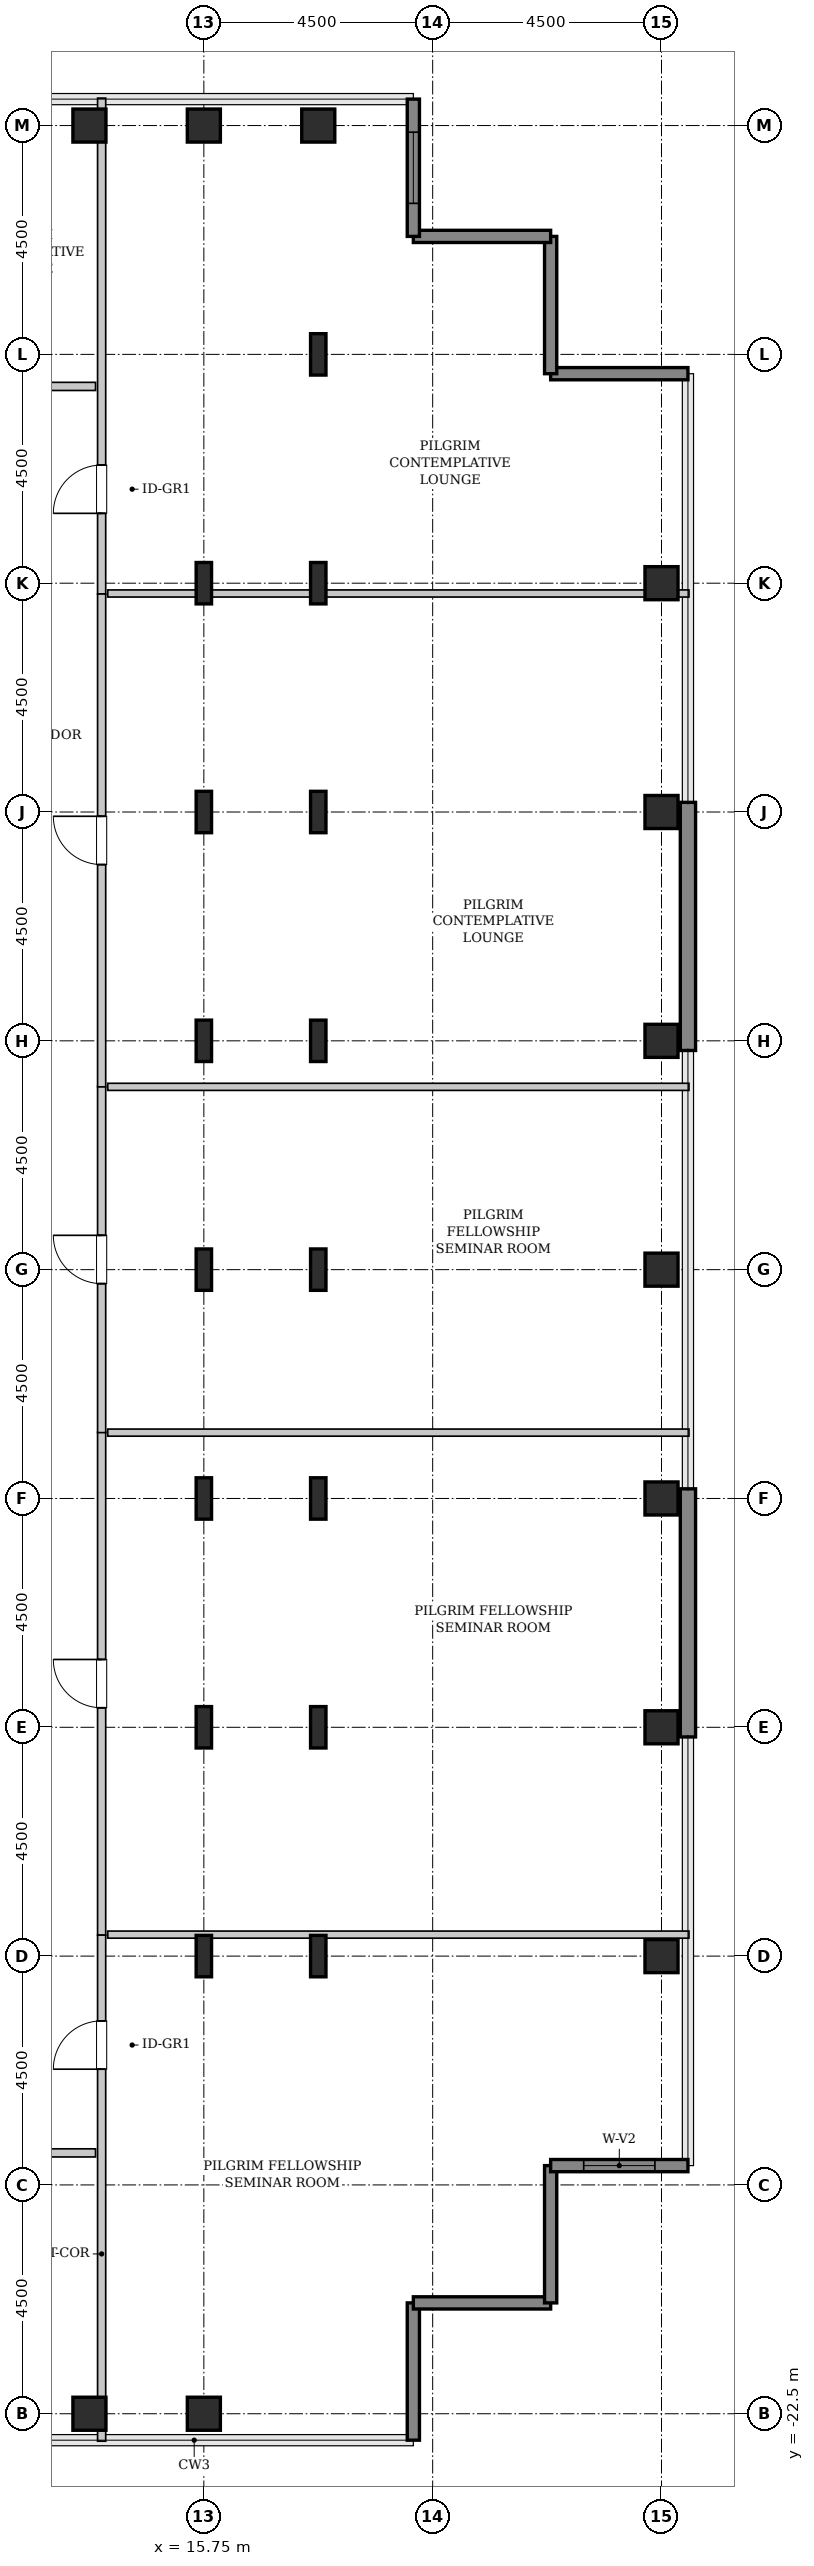
"""IFC4 building model, lengths in metres.
Left out: names, types, materials, properties, quantities, classifications, styles, units other than length and angle.
Written with IfcOpenShell. Run it as: python <this file> out.ifc"""

import sys

from ifc_helpers import new_model, si_unit, direction, frame, frame_2d, origin, origin_2d, place, context, subcontext, project, spatial, rectangle, hollow_rectangle, i_section, extrude, source, transform, mapped, element, fill, save


model = new_model("IFC4")
c1 = context("Model", 3, precision=1e-05, world=origin(), true_north=direction((0.0, 1.0)))
c2 = subcontext(c1, "Body", "Model", "MODEL_VIEW")
j1 = project(units=[si_unit("LENGTHUNIT", "METRE"), si_unit("PLANEANGLEUNIT", "RADIAN")], contexts=[c1])
p1 = place(None, origin())
s1 = spatial("IfcSite", under=j1, at=p1, CompositionType="ELEMENT")
p2 = place(p1, origin())
s2 = spatial("IfcBuilding", under=s1, at=p2, CompositionType="ELEMENT")
p3 = place(p2, frame((0.0, 0.0, 218.0)))
s3 = spatial("IfcBuildingStorey", under=s2, at=p3, CompositionType="ELEMENT", Elevation=218.0)
m1 = source(origin(), c2, "Body", "SweptSolid", [
    extrude(hollow_rectangle(XDim=0.65, YDim=0.65, WallThickness=0.032, InnerFilletRadius=0.032, OuterFilletRadius=0.064, at=origin_2d()), origin(), (0.0, 0.0, 1.0), 3.8),
])
for number, where, z_axis, x_axis in (
    (1, (13.5, -22.5, 0.0), (0.0, 0.0, 1.0), (1.0, 0.0, 0.0)),
    (2, (13.5, 22.5, 0.0), (0.0, 0.0, 1.0), (1.0, 0.0, 0.0)),
    (3, (15.75, -22.5, 0.0), (0.0, 0.0, 1.0), (1.0, 0.0, 0.0)),
):
    element("IfcColumn", number, at=place(p3, frame(where, z_axis=z_axis, x_axis=x_axis)), inside=s3, PredefinedType="COLUMN", context=c2, shape_type="MappedRepresentation", body=[
        mapped(m1, transform((0.0, 0.0, 0.0), x_axis=(1.0, 0.0, 0.0), y_axis=(0.0, 1.0, 0.0), z_axis=(0.0, 0.0, 1.0), scale=1.0)),
    ])
m2 = source(origin(), c2, "Body", "SweptSolid", [
    extrude(i_section(OverallWidth=0.303, OverallDepth=0.814, WebThickness=0.021, FlangeThickness=0.04, FilletRadius=0.03, at=origin_2d()), origin(), (0.0, 0.0, 1.0), 3.8),
])
for number, where, z_axis, x_axis in (
    (4, (15.75, -13.5, 0.0), (0.0, 0.0, 1.0), (1.0, 0.0, 0.0)),
    (5, (15.75, -9.0, 0.0), (0.0, 0.0, 1.0), (1.0, 0.0, 0.0)),
    (6, (15.75, -4.5, 0.0), (0.0, 0.0, 1.0), (1.0, 0.0, 0.0)),
    (7, (15.75, 0.0, 0.0), (0.0, 0.0, 1.0), (1.0, 0.0, 0.0)),
    (8, (15.75, 4.5, 0.0), (0.0, 0.0, 1.0), (1.0, 0.0, 0.0)),
    (9, (15.75, 9.0, 0.0), (0.0, 0.0, 1.0), (1.0, 0.0, 0.0)),
    (10, (15.75, 13.5, 0.0), (0.0, 0.0, 1.0), (1.0, 0.0, 0.0)),
):
    element("IfcColumn", number, at=place(p3, frame(where, z_axis=z_axis, x_axis=x_axis)), inside=s3, PredefinedType="COLUMN", context=c2, shape_type="MappedRepresentation", body=[
        mapped(m2, transform((0.0, 0.0, 0.0), x_axis=(1.0, 0.0, 0.0), y_axis=(0.0, 1.0, 0.0), z_axis=(0.0, 0.0, 1.0), scale=1.0)),
    ])
p4 = place(p3, frame((15.75, 22.5, 0.0), z_axis=(0.0, 0.0, 1.0), x_axis=(1.0, 0.0, 0.0)))
e11 = element("IfcColumn", 11, at=p4, inside=s3, PredefinedType="COLUMN", context=c2, shape_type="MappedRepresentation", body=[
    mapped(m1, transform((0.0, 0.0, 0.0), x_axis=(1.0, 0.0, 0.0), y_axis=(0.0, 1.0, 0.0), z_axis=(0.0, 0.0, 1.0), scale=1.0)),
])
for number, where, z_axis, x_axis in (
    (12, (18.0, -13.5, 0.0), (0.0, 0.0, 1.0), (1.0, 0.0, 0.0)),
    (13, (18.0, -9.0, 0.0), (0.0, 0.0, 1.0), (1.0, 0.0, 0.0)),
    (14, (18.0, -4.5, 0.0), (0.0, 0.0, 1.0), (1.0, 0.0, 0.0)),
    (15, (18.0, 0.0, 0.0), (0.0, 0.0, 1.0), (1.0, 0.0, 0.0)),
    (16, (18.0, 4.5, 0.0), (0.0, 0.0, 1.0), (1.0, 0.0, 0.0)),
    (17, (18.0, 9.0, 0.0), (0.0, 0.0, 1.0), (1.0, 0.0, 0.0)),
    (18, (18.0, 13.5, 0.0), (0.0, 0.0, 1.0), (1.0, 0.0, 0.0)),
    (19, (18.0, 18.0, 0.0), (0.0, 0.0, 1.0), (1.0, 0.0, 0.0)),
):
    element("IfcColumn", number, at=place(p3, frame(where, z_axis=z_axis, x_axis=x_axis)), inside=s3, PredefinedType="COLUMN", context=c2, shape_type="MappedRepresentation", body=[
        mapped(m2, transform((0.0, 0.0, 0.0), x_axis=(1.0, 0.0, 0.0), y_axis=(0.0, 1.0, 0.0), z_axis=(0.0, 0.0, 1.0), scale=1.0)),
    ])
for number, where, z_axis, x_axis in (
    (20, (18.0, 22.5, 0.0), (0.0, 0.0, 1.0), (1.0, 0.0, 0.0)),
    (21, (24.75, -13.5, 0.0), (0.0, 0.0, 1.0), (1.0, 0.0, 0.0)),
    (22, (24.75, -9.0, 0.0), (0.0, 0.0, 1.0), (1.0, 0.0, 0.0)),
    (23, (24.75, -4.5, 0.0), (0.0, 0.0, 1.0), (1.0, 0.0, 0.0)),
    (24, (24.75, 0.0, 0.0), (0.0, 0.0, 1.0), (1.0, 0.0, 0.0)),
    (25, (24.75, 4.5, 0.0), (0.0, 0.0, 1.0), (1.0, 0.0, 0.0)),
    (26, (24.75, 9.0, 0.0), (0.0, 0.0, 1.0), (1.0, 0.0, 0.0)),
    (27, (24.75, 13.5, 0.0), (0.0, 0.0, 1.0), (1.0, 0.0, 0.0)),
):
    element("IfcColumn", number, at=place(p3, frame(where, z_axis=z_axis, x_axis=x_axis)), inside=s3, PredefinedType="COLUMN", context=c2, shape_type="MappedRepresentation", body=[
        mapped(m1, transform((0.0, 0.0, 0.0), x_axis=(1.0, 0.0, 0.0), y_axis=(0.0, 1.0, 0.0), z_axis=(0.0, 0.0, 1.0), scale=1.0)),
    ])
m3 = source(origin(), c2, "Body", "SweptSolid", [
    extrude(rectangle(XDim=4.88, YDim=0.3, at=frame_2d((2.44, 0.0))), origin(), (0.0, 0.0, 1.0), 3.55),
])
for number, where, z_axis, x_axis in (
    (28, (25.27, -9.19, 0.0), (0.0, 0.0, 1.0), (0.0, 1.0, 0.0)),
    (29, (25.27, 4.31, 0.0), (0.0, 0.0, 1.0), (0.0, 1.0, 0.0)),
):
    element("IfcWall", number, at=place(p3, frame(where, z_axis=z_axis, x_axis=x_axis)), inside=s3, PredefinedType="SHEAR", context=c2, shape_type="MappedRepresentation", body=[
        mapped(m3, transform((0.0, 0.0, 0.0), x_axis=(1.0, 0.0, 0.0), y_axis=(0.0, 1.0, 0.0), z_axis=(0.0, 0.0, 1.0), scale=1.0)),
    ])
m4 = source(origin(), c2, "Body", "SweptSolid", [
    extrude(rectangle(XDim=2.7, YDim=0.24, at=frame_2d((1.35, 0.0))), origin(), (0.0, 0.0, 1.0), 3.55),
])
for number, where, z_axis, x_axis in (
    (30, (19.87, -23.02, 0.0), (0.0, 0.0, 1.0), (0.0, 1.0, 0.0)),
    (31, (19.87, -20.32, 0.0), (0.0, 0.0, 1.0), (1.0, 0.0, 0.0)),
    (32, (22.57, -20.32, 0.0), (0.0, 0.0, 1.0), (0.0, 1.0, 0.0)),
):
    element("IfcWall", number, at=place(p3, frame(where, z_axis=z_axis, x_axis=x_axis)), inside=s3, PredefinedType="SHEAR", context=c2, shape_type="MappedRepresentation", body=[
        mapped(m4, transform((0.0, 0.0, 0.0), x_axis=(1.0, 0.0, 0.0), y_axis=(0.0, 1.0, 0.0), z_axis=(0.0, 0.0, 1.0), scale=1.0)),
    ])
p5 = place(p3, frame((22.57, -17.62, 0.0), z_axis=(0.0, 0.0, 1.0), x_axis=(1.0, 0.0, 0.0)))
e33 = element("IfcWall", 33, at=p5, inside=s3, PredefinedType="SHEAR", context=c2, shape_type="MappedRepresentation", body=[
    mapped(m4, transform((0.0, 0.0, 0.0), x_axis=(1.0, 0.0, 0.0), y_axis=(0.0, 1.0, 0.0), z_axis=(0.0, 0.0, 1.0), scale=1.0)),
])
p6 = place(p5, frame((0.65, 0.0, 0.85)))
e34 = element("IfcOpeningElement", 34, at=p6, cuts=e33, PredefinedType="OPENING", context=c2, shape_type="SweptSolid", body=[
    extrude(rectangle(XDim=1.4, YDim=1.8, at=frame_2d((0.7, 0.9))), frame((0.0, 0.13, 0.0), z_axis=(0.0, -1.0, 0.0), x_axis=(1.0, 0.0, 0.0)), (0.0, 0.0, 1.0), 0.26),
])
for number, where, z_axis, x_axis in (
    (35, (25.27, 17.62, 0.0), (0.0, 0.0, 1.0), (-1.0, 0.0, 0.0)),
    (36, (22.57, 17.62, 0.0), (0.0, 0.0, 1.0), (0.0, 1.0, 0.0)),
    (37, (22.57, 20.32, 0.0), (0.0, 0.0, 1.0), (-1.0, 0.0, 0.0)),
):
    element("IfcWall", number, at=place(p3, frame(where, z_axis=z_axis, x_axis=x_axis)), inside=s3, PredefinedType="SHEAR", context=c2, shape_type="MappedRepresentation", body=[
        mapped(m4, transform((0.0, 0.0, 0.0), x_axis=(1.0, 0.0, 0.0), y_axis=(0.0, 1.0, 0.0), z_axis=(0.0, 0.0, 1.0), scale=1.0)),
    ])
p7 = place(p3, frame((19.87, 20.32, 0.0), z_axis=(0.0, 0.0, 1.0), x_axis=(0.0, 1.0, 0.0)))
e38 = element("IfcWall", 38, at=p7, inside=s3, PredefinedType="SHEAR", context=c2, shape_type="MappedRepresentation", body=[
    mapped(m4, transform((0.0, 0.0, 0.0), x_axis=(1.0, 0.0, 0.0), y_axis=(0.0, 1.0, 0.0), z_axis=(0.0, 0.0, 1.0), scale=1.0)),
])
p8 = place(p7, frame((0.65, 0.0, 0.85)))
e39 = element("IfcOpeningElement", 39, at=p8, cuts=e38, PredefinedType="OPENING", context=c2, shape_type="SweptSolid", body=[
    extrude(rectangle(XDim=1.4, YDim=1.8, at=frame_2d((0.7, 0.9))), frame((0.0, 0.13, 0.0), z_axis=(0.0, -1.0, 0.0), x_axis=(1.0, 0.0, 0.0)), (0.0, 0.0, 1.0), 0.26),
])
m5 = source(origin(), c2, "Body", "SweptSolid", [
    extrude(rectangle(XDim=9.892, YDim=0.16, at=frame_2d((4.946, 0.0))), origin(), (0.0, 0.0, 1.0), 3.535),
])
p9 = place(p3, frame((13.74, -13.087, 0.0), z_axis=(0.0, 0.0, 1.0), x_axis=(0.0, 1.0, 0.0)))
e40 = element("IfcWall", 40, at=p9, inside=s3, PredefinedType="PARTITIONING", context=c2, shape_type="MappedRepresentation", body=[
    mapped(m5, transform((0.0, 0.0, 0.0), x_axis=(1.0, 0.0, 0.0), y_axis=(0.0, 1.0, 0.0), z_axis=(0.0, 0.0, 1.0), scale=1.0)),
])
p10 = place(p9, frame((4.471, 0.0, 0.0)))
e41 = element("IfcOpeningElement", 41, at=p10, cuts=e40, PredefinedType="OPENING", context=c2, shape_type="SweptSolid", body=[
    extrude(rectangle(XDim=0.95, YDim=2.1, at=frame_2d((0.475, 1.05))), frame((0.0, 0.09, 0.0), z_axis=(0.0, -1.0, 0.0), x_axis=(1.0, 0.0, 0.0)), (0.0, 0.0, 1.0), 0.18),
])
m6 = source(origin(), c2, "Body", "SweptSolid", [
    extrude(rectangle(XDim=11.43, YDim=0.14, at=frame_2d((5.715, 0.0))), origin(), (0.0, 0.0, 1.0), 2.925),
])
p11 = place(p3, frame((13.86, -13.077, 0.0), z_axis=(0.0, 0.0, 1.0), x_axis=(1.0, 0.0, 0.0)))
e42 = element("IfcWall", 42, at=p11, inside=s3, PredefinedType="PARTITIONING", context=c2, shape_type="MappedRepresentation", body=[
    mapped(m6, transform((0.0, 0.0, 0.0), x_axis=(1.0, 0.0, 0.0), y_axis=(0.0, 1.0, 0.0), z_axis=(0.0, 0.0, 1.0), scale=1.0)),
])
m7 = source(origin(), c2, "Body", "SweptSolid", [
    extrude(rectangle(XDim=11.43, YDim=0.14, at=frame_2d((5.715, 0.0))), origin(), (0.0, 0.0, 1.0), 3.535),
])
p12 = place(p3, frame((13.86, -3.205, 0.0), z_axis=(0.0, 0.0, 1.0), x_axis=(1.0, 0.0, 0.0)))
e43 = element("IfcWall", 43, at=p12, inside=s3, PredefinedType="PARTITIONING", context=c2, shape_type="MappedRepresentation", body=[
    mapped(m7, transform((0.0, 0.0, 0.0), x_axis=(1.0, 0.0, 0.0), y_axis=(0.0, 1.0, 0.0), z_axis=(0.0, 0.0, 1.0), scale=1.0)),
])
m8 = source(origin(), c2, "Body", "SweptSolid", [
    extrude(rectangle(XDim=9.953, YDim=0.16, at=frame_2d((4.976, 0.0))), origin(), (0.0, 0.0, 1.0), 3.535),
])
p13 = place(p3, frame((13.74, -23.04, 0.0), z_axis=(0.0, 0.0, 1.0), x_axis=(0.0, 1.0, 0.0)))
e44 = element("IfcWall", 44, at=p13, inside=s3, PredefinedType="PARTITIONING", context=c2, shape_type="MappedRepresentation", body=[
    mapped(m8, transform((0.0, 0.0, 0.0), x_axis=(1.0, 0.0, 0.0), y_axis=(0.0, 1.0, 0.0), z_axis=(0.0, 0.0, 1.0), scale=1.0)),
])
p14 = place(p13, frame((7.316, 0.0, 0.0)))
e45 = element("IfcOpeningElement", 45, at=p14, cuts=e44, PredefinedType="OPENING", context=c2, shape_type="SweptSolid", body=[
    extrude(rectangle(XDim=0.95, YDim=2.1, at=frame_2d((0.475, 1.05))), frame((0.0, 0.09, 0.0), z_axis=(0.0, -1.0, 0.0), x_axis=(1.0, 0.0, 0.0)), (0.0, 0.0, 1.0), 0.18),
])
m9 = source(origin(), c2, "Body", "SweptSolid", [
    extrude(rectangle(XDim=6.81, YDim=0.16, at=frame_2d((3.405, 0.0))), origin(), (0.0, 0.0, 1.0), 3.535),
])
p15 = place(p3, frame((13.74, -3.205, 0.0), z_axis=(0.0, 0.0, 1.0), x_axis=(0.0, 1.0, 0.0)))
e46 = element("IfcWall", 46, at=p15, inside=s3, PredefinedType="PARTITIONING", context=c2, shape_type="MappedRepresentation", body=[
    mapped(m9, transform((0.0, 0.0, 0.0), x_axis=(1.0, 0.0, 0.0), y_axis=(0.0, 1.0, 0.0), z_axis=(0.0, 0.0, 1.0), scale=1.0)),
])
p16 = place(p15, frame((2.93, 0.0, 0.0)))
e47 = element("IfcOpeningElement", 47, at=p16, cuts=e46, PredefinedType="OPENING", context=c2, shape_type="SweptSolid", body=[
    extrude(rectangle(XDim=0.95, YDim=2.1, at=frame_2d((0.475, 1.05))), frame((0.0, 0.09, 0.0), z_axis=(0.0, -1.0, 0.0), x_axis=(1.0, 0.0, 0.0)), (0.0, 0.0, 1.0), 0.18),
])
p17 = place(p3, frame((13.86, 3.595, 0.0), z_axis=(0.0, 0.0, 1.0), x_axis=(1.0, 0.0, 0.0)))
e48 = element("IfcWall", 48, at=p17, inside=s3, PredefinedType="PARTITIONING", context=c2, shape_type="MappedRepresentation", body=[
    mapped(m7, transform((0.0, 0.0, 0.0), x_axis=(1.0, 0.0, 0.0), y_axis=(0.0, 1.0, 0.0), z_axis=(0.0, 0.0, 1.0), scale=1.0)),
])
m10 = source(origin(), c2, "Body", "SweptSolid", [
    extrude(rectangle(XDim=9.752, YDim=0.16, at=frame_2d((4.876, 0.0))), origin(), (0.0, 0.0, 1.0), 3.535),
])
p18 = place(p3, frame((13.74, 13.288, 0.0), z_axis=(0.0, 0.0, 1.0), x_axis=(0.0, 1.0, 0.0)))
e49 = element("IfcWall", 49, at=p18, inside=s3, PredefinedType="PARTITIONING", context=c2, shape_type="MappedRepresentation", body=[
    mapped(m10, transform((0.0, 0.0, 0.0), x_axis=(1.0, 0.0, 0.0), y_axis=(0.0, 1.0, 0.0), z_axis=(0.0, 0.0, 1.0), scale=1.0)),
])
p19 = place(p18, frame((1.586, 0.0, 0.0)))
e50 = element("IfcOpeningElement", 50, at=p19, cuts=e49, PredefinedType="OPENING", context=c2, shape_type="SweptSolid", body=[
    extrude(rectangle(XDim=0.95, YDim=2.1, at=frame_2d((0.475, 1.05))), frame((0.0, 0.09, 0.0), z_axis=(0.0, -1.0, 0.0), x_axis=(1.0, 0.0, 0.0)), (0.0, 0.0, 1.0), 0.18),
])
p20 = place(p3, frame((13.86, 13.298, 0.0), z_axis=(0.0, 0.0, 1.0), x_axis=(1.0, 0.0, 0.0)))
e51 = element("IfcWall", 51, at=p20, inside=s3, PredefinedType="PARTITIONING", context=c2, shape_type="MappedRepresentation", body=[
    mapped(m6, transform((0.0, 0.0, 0.0), x_axis=(1.0, 0.0, 0.0), y_axis=(0.0, 1.0, 0.0), z_axis=(0.0, 0.0, 1.0), scale=1.0)),
])
m11 = source(origin(), c2, "Body", "SweptSolid", [
    extrude(rectangle(XDim=9.693, YDim=0.16, at=frame_2d((4.846, 0.0))), origin(), (0.0, 0.0, 1.0), 3.535),
])
p21 = place(p3, frame((13.74, 3.595, 0.0), z_axis=(0.0, 0.0, 1.0), x_axis=(0.0, 1.0, 0.0)))
e52 = element("IfcWall", 52, at=p21, inside=s3, PredefinedType="PARTITIONING", context=c2, shape_type="MappedRepresentation", body=[
    mapped(m11, transform((0.0, 0.0, 0.0), x_axis=(1.0, 0.0, 0.0), y_axis=(0.0, 1.0, 0.0), z_axis=(0.0, 0.0, 1.0), scale=1.0)),
])
p22 = place(p21, frame((4.371, 0.0, 0.0)))
e53 = element("IfcOpeningElement", 53, at=p22, cuts=e52, PredefinedType="OPENING", context=c2, shape_type="SweptSolid", body=[
    extrude(rectangle(XDim=0.95, YDim=2.1, at=frame_2d((0.475, 1.05))), frame((0.0, 0.09, 0.0), z_axis=(0.0, -1.0, 0.0), x_axis=(1.0, 0.0, 0.0)), (0.0, 0.0, 1.0), 0.18),
])
m12 = source(origin(), c2, "Body", "SweptSolid", [
    extrude(rectangle(XDim=10.478, YDim=0.16, at=frame_2d((5.239, 0.0))), origin(), (0.0, 0.0, 1.0), 3.535),
])
p23 = place(p3, frame((3.143, 17.37, 0.0), z_axis=(0.0, 0.0, 1.0), x_axis=(1.0, 0.0, 0.0)))
e54 = element("IfcWall", 54, at=p23, inside=s3, PredefinedType="PARTITIONING", context=c2, shape_type="MappedRepresentation", body=[
    mapped(m12, transform((0.0, 0.0, 0.0), x_axis=(1.0, 0.0, 0.0), y_axis=(0.0, 1.0, 0.0), z_axis=(0.0, 0.0, 1.0), scale=1.0)),
])
p24 = place(p23, frame((4.764, 0.0, 0.0)))
e55 = element("IfcOpeningElement", 55, at=p24, cuts=e54, PredefinedType="OPENING", context=c2, shape_type="SweptSolid", body=[
    extrude(rectangle(XDim=0.95, YDim=2.1, at=frame_2d((0.475, 1.05))), frame((0.0, 0.09, 0.0), z_axis=(0.0, -1.0, 0.0), x_axis=(1.0, 0.0, 0.0)), (0.0, 0.0, 1.0), 0.18),
])
m13 = source(origin(), c2, "Body", "SweptSolid", [
    extrude(rectangle(XDim=9.425, YDim=0.16, at=frame_2d((4.712, 0.0))), origin(), (0.0, 0.0, 1.0), 3.535),
])
p25 = place(p3, frame((4.195, -17.37, 0.0), z_axis=(0.0, 0.0, 1.0), x_axis=(1.0, 0.0, 0.0)))
e56 = element("IfcWall", 56, at=p25, inside=s3, PredefinedType="PARTITIONING", context=c2, shape_type="MappedRepresentation", body=[
    mapped(m13, transform((0.0, 0.0, 0.0), x_axis=(1.0, 0.0, 0.0), y_axis=(0.0, 1.0, 0.0), z_axis=(0.0, 0.0, 1.0), scale=1.0)),
])
p26 = place(p25, frame((4.238, 0.0, 0.0)))
e57 = element("IfcOpeningElement", 57, at=p26, cuts=e56, PredefinedType="OPENING", context=c2, shape_type="SweptSolid", body=[
    extrude(rectangle(XDim=0.95, YDim=2.1, at=frame_2d((0.475, 1.05))), frame((0.0, 0.09, 0.0), z_axis=(0.0, -1.0, 0.0), x_axis=(1.0, 0.0, 0.0)), (0.0, 0.0, 1.0), 0.18),
])
m14 = source(origin(), c2, "Body", "SweptSolid", [
    extrude(rectangle(XDim=1.4, YDim=1.8, at=frame_2d((0.7, 0.9))), frame((0.0, 0.03, 0.0), z_axis=(0.0, -1.0, 0.0), x_axis=(1.0, 0.0, 0.0)), (0.0, 0.0, 1.0), 0.06),
])
p27 = place(p6, origin())
e58 = element("IfcWindow", 58, at=p27, inside=s3, PartitioningType="SINGLE_PANEL", PredefinedType="WINDOW", context=c2, shape_type="MappedRepresentation", body=[
    mapped(m14, transform((0.0, 0.0, 0.0), x_axis=(1.0, 0.0, 0.0), y_axis=(0.0, 1.0, 0.0), z_axis=(0.0, 0.0, 1.0), scale=1.0)),
])
fill(e34, e58)
p28 = place(p8, origin())
e59 = element("IfcWindow", 59, at=p28, inside=s3, PartitioningType="SINGLE_PANEL", PredefinedType="WINDOW", context=c2, shape_type="MappedRepresentation", body=[
    mapped(m14, transform((0.0, 0.0, 0.0), x_axis=(1.0, 0.0, 0.0), y_axis=(0.0, 1.0, 0.0), z_axis=(0.0, 0.0, 1.0), scale=1.0)),
])
fill(e39, e59)
m15 = source(origin(), c2, "Body", "SweptSolid", [
    extrude(rectangle(XDim=0.95, YDim=2.1, at=frame_2d((0.475, 1.05))), frame((0.0, 0.025, 0.0), z_axis=(0.0, -1.0, 0.0), x_axis=(1.0, 0.0, 0.0)), (0.0, 0.0, 1.0), 0.05),
])
p29 = place(p10, origin())
e60 = element("IfcDoor", 60, at=p29, inside=s3, OperationType="SINGLE_SWING_RIGHT", PredefinedType="DOOR", context=c2, shape_type="MappedRepresentation", body=[
    mapped(m15, transform((0.0, 0.0, 0.0), x_axis=(1.0, 0.0, 0.0), y_axis=(0.0, 1.0, 0.0), z_axis=(0.0, 0.0, 1.0), scale=1.0)),
])
fill(e41, e60)
p30 = place(p14, origin())
e61 = element("IfcDoor", 61, at=p30, inside=s3, OperationType="SINGLE_SWING_LEFT", PredefinedType="DOOR", context=c2, shape_type="MappedRepresentation", body=[
    mapped(m15, transform((0.0, 0.0, 0.0), x_axis=(1.0, 0.0, 0.0), y_axis=(0.0, 1.0, 0.0), z_axis=(0.0, 0.0, 1.0), scale=1.0)),
])
fill(e45, e61)
p31 = place(p16, origin())
e62 = element("IfcDoor", 62, at=p31, inside=s3, OperationType="SINGLE_SWING_RIGHT", PredefinedType="DOOR", context=c2, shape_type="MappedRepresentation", body=[
    mapped(m15, transform((0.0, 0.0, 0.0), x_axis=(1.0, 0.0, 0.0), y_axis=(0.0, 1.0, 0.0), z_axis=(0.0, 0.0, 1.0), scale=1.0)),
])
fill(e47, e62)
p32 = place(p19, origin())
e63 = element("IfcDoor", 63, at=p32, inside=s3, OperationType="SINGLE_SWING_LEFT", PredefinedType="DOOR", context=c2, shape_type="MappedRepresentation", body=[
    mapped(m15, transform((0.0, 0.0, 0.0), x_axis=(1.0, 0.0, 0.0), y_axis=(0.0, 1.0, 0.0), z_axis=(0.0, 0.0, 1.0), scale=1.0)),
])
fill(e50, e63)
p33 = place(p22, origin())
e64 = element("IfcDoor", 64, at=p33, inside=s3, OperationType="SINGLE_SWING_RIGHT", PredefinedType="DOOR", context=c2, shape_type="MappedRepresentation", body=[
    mapped(m15, transform((0.0, 0.0, 0.0), x_axis=(1.0, 0.0, 0.0), y_axis=(0.0, 1.0, 0.0), z_axis=(0.0, 0.0, 1.0), scale=1.0)),
])
fill(e53, e64)
save(model, sys.argv[1])
